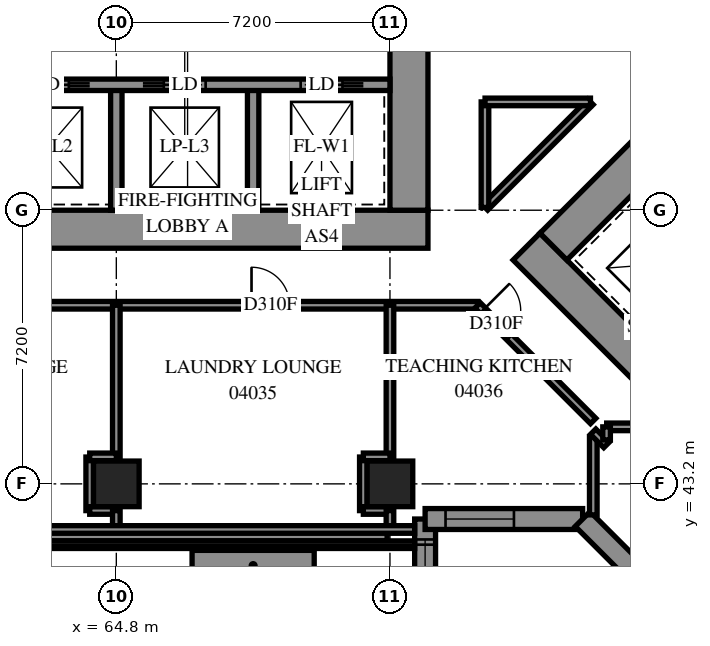
"""IFC4 building model, lengths in metres.
Left out: names, types, materials, properties, quantities, classifications, styles, units other than length and angle.
Written with IfcOpenShell. Run it as: python <this file> out.ifc"""

import sys

from ifc_helpers import new_model, si_unit, direction, frame, frame_2d, origin, origin_2d, place, context, subcontext, project, spatial, polyline, rectangle, outline, extrude, element, fill, save


model = new_model("IFC4")
c1 = context("Model", 3, precision=1e-05, world=origin(), true_north=direction((0.0, 1.0)))
c2 = subcontext(c1, "Body", "Model", "MODEL_VIEW")
j1 = project(units=[si_unit("LENGTHUNIT", "METRE"), si_unit("PLANEANGLEUNIT", "RADIAN")], contexts=[c1])
p1 = place(None, origin())
s1 = spatial("IfcSite", under=j1, at=p1, CompositionType="ELEMENT")
p2 = place(p1, origin())
s2 = spatial("IfcBuilding", under=s1, at=p2, CompositionType="ELEMENT")
p3 = place(p2, frame((0.0, 0.0, 18.6)))
s3 = spatial("IfcBuildingStorey", under=s2, at=p3, CompositionType="ELEMENT", Elevation=18.6)
for number, where, z_axis, x_axis in (
    (1, (64.8, 43.2, 0.0), (0.0, 0.0, 1.0), (1.0, 0.0, 0.0)),
    (2, (72.0, 43.2, 0.0), (0.0, 0.0, 1.0), (1.0, 0.0, 0.0)),
):
    element("IfcColumn", number, at=place(p3, frame(where, z_axis=z_axis, x_axis=x_axis)), inside=s3, PredefinedType="COLUMN", context=c2, shape_type="SweptSolid", body=[
        extrude(rectangle(XDim=1.2, YDim=1.2, at=origin_2d()), origin(), (0.0, 0.0, 1.0), 3.8),
    ])
p4 = place(p3, frame((56.6, 49.9, -0.4), z_axis=(0.0, 0.0, 1.0), x_axis=(1.0, 0.0, 0.0)))
e3 = element("IfcWall", 3, at=p4, inside=s3, PredefinedType="SHEAR", context=c2, shape_type="SweptSolid", body=[
    extrude(rectangle(XDim=16.4, YDim=1.0, at=frame_2d((8.2, 0.0))), origin(), (0.0, 0.0, 1.0), 3.5),
])
p5 = place(p3, frame((72.5, 50.4, -0.4), z_axis=(0.0, 0.0, 1.0), x_axis=(0.0, 1.0, 0.0)))
e4 = element("IfcWall", 4, at=p5, inside=s3, PredefinedType="SHEAR", context=c2, shape_type="SweptSolid", body=[
    extrude(rectangle(XDim=14.4, YDim=1.0, at=frame_2d((7.2, 0.0))), origin(), (0.0, 0.0, 1.0), 3.5),
])
p6 = place(p5, frame((4.55, 0.0, 0.4)))
e5 = element("IfcOpeningElement", 5, at=p6, cuts=e4, PredefinedType="OPENING", context=c2, shape_type="SweptSolid", body=[
    extrude(rectangle(XDim=1.1, YDim=2.1, at=frame_2d((0.55, 1.05))), frame((0.0, 0.51, 0.0), z_axis=(0.0, -1.0, 0.0), x_axis=(1.0, 0.0, 0.0)), (0.0, 0.0, 1.0), 1.02),
])
p7 = place(p5, frame((11.35, 0.0, 0.4)))
e6 = element("IfcOpeningElement", 6, at=p7, cuts=e4, PredefinedType="OPENING", context=c2, shape_type="SweptSolid", body=[
    extrude(rectangle(XDim=1.1, YDim=2.1, at=frame_2d((0.55, 1.05))), frame((0.0, 0.51, 0.0), z_axis=(0.0, -1.0, 0.0), x_axis=(1.0, 0.0, 0.0)), (0.0, 0.0, 1.0), 1.02),
])
for number, where, z_axis, x_axis in (
    (7, (64.8, 50.4, 0.0), (0.0, 0.0, 1.0), (0.0, 1.0, 0.0)),
    (8, (68.4, 50.4, 0.0), (0.0, 0.0, 1.0), (0.0, 1.0, 0.0)),
):
    element("IfcWall", number, at=place(p3, frame(where, z_axis=z_axis, x_axis=x_axis)), inside=s3, PredefinedType="SOLIDWALL", context=c2, shape_type="SweptSolid", body=[
        extrude(rectangle(XDim=3.3, YDim=0.3, at=frame_2d((1.65, 0.0))), origin(), (0.0, 0.0, 1.0), 3.8),
    ])
p8 = place(p3, frame((57.6, 53.7, 0.0), z_axis=(0.0, 0.0, 1.0), x_axis=(1.0, 0.0, 0.0)))
e9 = element("IfcWall", 9, at=p8, inside=s3, PredefinedType="SOLIDWALL", context=c2, shape_type="SweptSolid", body=[
    extrude(rectangle(XDim=14.4, YDim=0.3, at=frame_2d((7.2, 0.0))), origin(), (0.0, 0.0, 1.0), 3.8),
])
p9 = place(p8, frame((1.25, 0.0, 0.0)))
e10 = element("IfcOpeningElement", 10, at=p9, cuts=e9, PredefinedType="OPENING", context=c2, shape_type="SweptSolid", body=[
    extrude(rectangle(XDim=1.1, YDim=2.1, at=frame_2d((0.55, 1.05))), frame((0.0, 0.16, 0.0), z_axis=(0.0, -1.0, 0.0), x_axis=(1.0, 0.0, 0.0)), (0.0, 0.0, 1.0), 0.32),
])
p10 = place(p8, frame((4.85, 0.0, 0.0)))
e11 = element("IfcOpeningElement", 11, at=p10, cuts=e9, PredefinedType="OPENING", context=c2, shape_type="SweptSolid", body=[
    extrude(rectangle(XDim=1.1, YDim=2.1, at=frame_2d((0.55, 1.05))), frame((0.0, 0.16, 0.0), z_axis=(0.0, -1.0, 0.0), x_axis=(1.0, 0.0, 0.0)), (0.0, 0.0, 1.0), 0.32),
])
p11 = place(p8, frame((8.45, 0.0, 0.0)))
e12 = element("IfcOpeningElement", 12, at=p11, cuts=e9, PredefinedType="OPENING", context=c2, shape_type="SweptSolid", body=[
    extrude(rectangle(XDim=1.1, YDim=2.1, at=frame_2d((0.55, 1.05))), frame((0.0, 0.16, 0.0), z_axis=(0.0, -1.0, 0.0), x_axis=(1.0, 0.0, 0.0)), (0.0, 0.0, 1.0), 0.32),
])
p12 = place(p8, frame((12.05, 0.0, 0.0)))
e13 = element("IfcOpeningElement", 13, at=p12, cuts=e9, PredefinedType="OPENING", context=c2, shape_type="SweptSolid", body=[
    extrude(rectangle(XDim=1.1, YDim=2.1, at=frame_2d((0.55, 1.05))), frame((0.0, 0.16, 0.0), z_axis=(0.0, -1.0, 0.0), x_axis=(1.0, 0.0, 0.0)), (0.0, 0.0, 1.0), 0.32),
])
p13 = place(p3, frame((75.594, 49.443, -0.4), z_axis=(0.0, 0.0, 1.0), x_axis=(0.7071037324, -0.70710983, 0.0)))
e14 = element("IfcWall", 14, at=p13, inside=s3, PredefinedType="SHEAR", context=c2, shape_type="SweptSolid", body=[
    extrude(rectangle(XDim=16.4, YDim=1.0, at=frame_2d((8.2, 0.0))), origin(), (0.0, 0.0, 1.0), 3.5),
])
p14 = place(p3, frame((76.301, 49.443, -0.4), z_axis=(0.0, 0.0, 1.0), x_axis=(0.7071067812, 0.7071067812, 0.0)))
e15 = element("IfcWall", 15, at=p14, inside=s3, PredefinedType="SHEAR", context=c2, shape_type="SweptSolid", body=[
    extrude(rectangle(XDim=14.4, YDim=1.0, at=frame_2d((7.2, 0.0))), origin(), (0.0, 0.0, 1.0), 3.5),
])
p15 = place(p14, frame((4.55, 0.0, 0.4)))
e16 = element("IfcOpeningElement", 16, at=p15, cuts=e15, PredefinedType="OPENING", context=c2, shape_type="SweptSolid", body=[
    extrude(rectangle(XDim=1.1, YDim=2.1, at=frame_2d((0.55, 1.05))), frame((0.0, 0.51, 0.0), z_axis=(0.0, -1.0, 0.0), x_axis=(1.0, 0.0, 0.0)), (0.0, 0.0, 1.0), 1.02),
])
p16 = place(p14, frame((11.35, 0.0, 0.4)))
e17 = element("IfcOpeningElement", 17, at=p16, cuts=e15, PredefinedType="OPENING", context=c2, shape_type="SweptSolid", body=[
    extrude(rectangle(XDim=1.1, YDim=2.1, at=frame_2d((0.55, 1.05))), frame((0.0, 0.51, 0.0), z_axis=(0.0, -1.0, 0.0), x_axis=(1.0, 0.0, 0.0)), (0.0, 0.0, 1.0), 1.02),
])
p17 = place(p3, frame((72.925, 35.075, 0.0), z_axis=(0.0, 0.0, 1.0), x_axis=(0.0, 1.0, 0.0)))
e18 = element("IfcWall", 18, at=p17, inside=s3, PredefinedType="SOLIDWALL", context=c2, shape_type="SweptSolid", body=[
    extrude(outline(polyline([(-0.275, -0.275), (6.925, -0.275), (7.475, 0.275), (0.275, 0.275), (-0.275, -0.275)])), origin(), (0.0, 0.0, 1.0), 3.8),
])
p18 = place(p17, frame((1.825, 0.0, 0.7)))
e19 = element("IfcOpeningElement", 19, at=p18, cuts=e18, PredefinedType="OPENING", context=c2, shape_type="SweptSolid", body=[
    extrude(rectangle(XDim=1.8, YDim=2.4, at=frame_2d((0.9, 1.2))), frame((0.0, 0.285, 0.0), z_axis=(0.0, -1.0, 0.0), x_axis=(1.0, 0.0, 0.0)), (0.0, 0.0, 1.0), 0.57),
])
p19 = place(p17, frame((4.862, 0.0, 0.7)))
e20 = element("IfcOpeningElement", 20, at=p19, cuts=e18, PredefinedType="OPENING", context=c2, shape_type="SweptSolid", body=[
    extrude(rectangle(XDim=1.8, YDim=2.4, at=frame_2d((0.9, 1.2))), frame((0.0, 0.285, 0.0), z_axis=(0.0, -1.0, 0.0), x_axis=(1.0, 0.0, 0.0)), (0.0, 0.0, 1.0), 0.57),
])
p20 = place(p3, frame((72.925, 42.275, 0.0), z_axis=(0.0, 0.0, 1.0), x_axis=(1.0, 0.0, 0.0)))
e21 = element("IfcWall", 21, at=p20, inside=s3, PredefinedType="SOLIDWALL", context=c2, shape_type="SweptSolid", body=[
    extrude(outline(polyline([(0.275, -0.275), (4.031, -0.275), (4.259, 0.275), (-0.275, 0.275), (0.275, -0.275)])), origin(), (0.0, 0.0, 1.0), 3.8),
])
p21 = place(p20, frame((0.537, 0.0, 0.7)))
e22 = element("IfcOpeningElement", 22, at=p21, cuts=e21, PredefinedType="OPENING", context=c2, shape_type="SweptSolid", body=[
    extrude(rectangle(XDim=1.8, YDim=2.4, at=frame_2d((0.9, 1.2))), frame((0.0, 0.285, 0.0), z_axis=(0.0, -1.0, 0.0), x_axis=(1.0, 0.0, 0.0)), (0.0, 0.0, 1.0), 0.57),
])
p22 = place(p3, frame((77.07, 42.275, 0.0), z_axis=(0.0, 0.0, 1.0), x_axis=(0.7071067812, -0.7071067812, 0.0)))
e23 = element("IfcWall", 23, at=p22, inside=s3, PredefinedType="SOLIDWALL", context=c2, shape_type="SweptSolid", body=[
    extrude(outline(polyline([(0.114, -0.275), (39.288, -0.275), (38.737, 0.275), (-0.114, 0.275), (0.114, -0.275)])), origin(), (0.0, 0.0, 1.0), 3.8),
])
p23 = place(p22, frame((2.837, 0.0, 0.7)))
e24 = element("IfcOpeningElement", 24, at=p23, cuts=e23, PredefinedType="OPENING", context=c2, shape_type="SweptSolid", body=[
    extrude(rectangle(XDim=1.8, YDim=2.4, at=frame_2d((0.9, 1.2))), frame((0.0, 0.285, 0.0), z_axis=(0.0, -1.0, 0.0), x_axis=(1.0, 0.0, 0.0)), (0.0, 0.0, 1.0), 0.57),
])
p24 = place(p22, frame((6.588, 0.0, 0.7)))
e25 = element("IfcOpeningElement", 25, at=p24, cuts=e23, PredefinedType="OPENING", context=c2, shape_type="SweptSolid", body=[
    extrude(rectangle(XDim=1.8, YDim=2.4, at=frame_2d((0.9, 1.2))), frame((0.0, 0.285, 0.0), z_axis=(0.0, -1.0, 0.0), x_axis=(1.0, 0.0, 0.0)), (0.0, 0.0, 1.0), 0.57),
])
p25 = place(p22, frame((10.188, 0.0, 0.7)))
e26 = element("IfcOpeningElement", 26, at=p25, cuts=e23, PredefinedType="OPENING", context=c2, shape_type="SweptSolid", body=[
    extrude(rectangle(XDim=1.8, YDim=2.4, at=frame_2d((0.9, 1.2))), frame((0.0, 0.285, 0.0), z_axis=(0.0, -1.0, 0.0), x_axis=(1.0, 0.0, 0.0)), (0.0, 0.0, 1.0), 0.57),
])
p26 = place(p22, frame((13.787, 0.0, 0.7)))
e27 = element("IfcOpeningElement", 27, at=p26, cuts=e23, PredefinedType="OPENING", context=c2, shape_type="SweptSolid", body=[
    extrude(rectangle(XDim=1.8, YDim=2.4, at=frame_2d((0.9, 1.2))), frame((0.0, 0.285, 0.0), z_axis=(0.0, -1.0, 0.0), x_axis=(1.0, 0.0, 0.0)), (0.0, 0.0, 1.0), 0.57),
])
p27 = place(p22, frame((17.387, 0.0, 0.7)))
e28 = element("IfcOpeningElement", 28, at=p27, cuts=e23, PredefinedType="OPENING", context=c2, shape_type="SweptSolid", body=[
    extrude(rectangle(XDim=1.8, YDim=2.4, at=frame_2d((0.9, 1.2))), frame((0.0, 0.285, 0.0), z_axis=(0.0, -1.0, 0.0), x_axis=(1.0, 0.0, 0.0)), (0.0, 0.0, 1.0), 0.57),
])
p28 = place(p22, frame((20.988, 0.0, 0.7)))
e29 = element("IfcOpeningElement", 29, at=p28, cuts=e23, PredefinedType="OPENING", context=c2, shape_type="SweptSolid", body=[
    extrude(rectangle(XDim=1.8, YDim=2.4, at=frame_2d((0.9, 1.2))), frame((0.0, 0.285, 0.0), z_axis=(0.0, -1.0, 0.0), x_axis=(1.0, 0.0, 0.0)), (0.0, 0.0, 1.0), 0.57),
])
p29 = place(p22, frame((24.587, 0.0, 0.7)))
e30 = element("IfcOpeningElement", 30, at=p29, cuts=e23, PredefinedType="OPENING", context=c2, shape_type="SweptSolid", body=[
    extrude(rectangle(XDim=1.8, YDim=2.4, at=frame_2d((0.9, 1.2))), frame((0.0, 0.285, 0.0), z_axis=(0.0, -1.0, 0.0), x_axis=(1.0, 0.0, 0.0)), (0.0, 0.0, 1.0), 0.57),
])
p30 = place(p22, frame((28.188, 0.0, 0.7)))
e31 = element("IfcOpeningElement", 31, at=p30, cuts=e23, PredefinedType="OPENING", context=c2, shape_type="SweptSolid", body=[
    extrude(rectangle(XDim=1.8, YDim=2.4, at=frame_2d((0.9, 1.2))), frame((0.0, 0.285, 0.0), z_axis=(0.0, -1.0, 0.0), x_axis=(1.0, 0.0, 0.0)), (0.0, 0.0, 1.0), 0.57),
])
p31 = place(p22, frame((31.788, 0.0, 0.7)))
e32 = element("IfcOpeningElement", 32, at=p31, cuts=e23, PredefinedType="OPENING", context=c2, shape_type="SweptSolid", body=[
    extrude(rectangle(XDim=1.8, YDim=2.4, at=frame_2d((0.9, 1.2))), frame((0.0, 0.285, 0.0), z_axis=(0.0, -1.0, 0.0), x_axis=(1.0, 0.0, 0.0)), (0.0, 0.0, 1.0), 0.57),
])
p32 = place(p22, frame((35.388, 0.0, 0.7)))
e33 = element("IfcOpeningElement", 33, at=p32, cuts=e23, PredefinedType="OPENING", context=c2, shape_type="SweptSolid", body=[
    extrude(rectangle(XDim=1.8, YDim=2.4, at=frame_2d((0.9, 1.2))), frame((0.0, 0.285, 0.0), z_axis=(0.0, -1.0, 0.0), x_axis=(1.0, 0.0, 0.0)), (0.0, 0.0, 1.0), 0.57),
])
p33 = place(p3, frame((55.1, 47.9, 0.0), z_axis=(0.0, 0.0, 1.0), x_axis=(1.0, 0.0, 0.0)))
e34 = element("IfcWall", 34, at=p33, inside=s3, PredefinedType="PARTITIONING", context=c2, shape_type="SweptSolid", body=[
    extrude(rectangle(XDim=19.208, YDim=0.2, at=frame_2d((9.604, 0.0))), origin(), (0.0, 0.0, 1.0), 3.8),
])
p34 = place(p33, frame((6.058, 0.0, 0.0)))
e35 = element("IfcOpeningElement", 35, at=p34, cuts=e34, PredefinedType="OPENING", context=c2, shape_type="SweptSolid", body=[
    extrude(rectangle(XDim=1.0, YDim=2.1, at=frame_2d((0.5, 1.05))), frame((0.0, 0.11, 0.0), z_axis=(0.0, -1.0, 0.0), x_axis=(1.0, 0.0, 0.0)), (0.0, 0.0, 1.0), 0.22),
])
p35 = place(p33, frame((13.258, 0.0, 0.0)))
e36 = element("IfcOpeningElement", 36, at=p35, cuts=e34, PredefinedType="OPENING", context=c2, shape_type="SweptSolid", body=[
    extrude(rectangle(XDim=1.0, YDim=2.1, at=frame_2d((0.5, 1.05))), frame((0.0, 0.11, 0.0), z_axis=(0.0, -1.0, 0.0), x_axis=(1.0, 0.0, 0.0)), (0.0, 0.0, 1.0), 0.22),
])
p36 = place(p3, frame((74.305, 47.897, 0.0), z_axis=(0.0, 0.0, 1.0), x_axis=(0.7071067812, -0.7071067812, 0.0)))
e37 = element("IfcWall", 37, at=p36, inside=s3, PredefinedType="PARTITIONING", context=c2, shape_type="SweptSolid", body=[
    extrude(rectangle(XDim=4.302, YDim=0.2, at=frame_2d((2.151, 0.0))), origin(), (0.0, 0.0, 1.0), 3.8),
])
p37 = place(p36, frame((0.192, 0.0, 0.0)))
e38 = element("IfcOpeningElement", 38, at=p37, cuts=e37, PredefinedType="OPENING", context=c2, shape_type="SweptSolid", body=[
    extrude(rectangle(XDim=1.0, YDim=2.1, at=frame_2d((0.5, 1.05))), frame((0.0, 0.11, 0.0), z_axis=(0.0, -1.0, 0.0), x_axis=(1.0, 0.0, 0.0)), (0.0, 0.0, 1.0), 0.22),
])
for number, where, z_axis, x_axis in (
    (39, (64.8, 43.906, 0.0), (0.0, 0.0, 1.0), (0.0, 1.0, 0.0)),
    (40, (72.0, 43.906, 0.0), (0.0, 0.0, 1.0), (0.0, 1.0, 0.0)),
):
    element("IfcWall", number, at=place(p3, frame(where, z_axis=z_axis, x_axis=x_axis)), inside=s3, PredefinedType="PARTITIONING", context=c2, shape_type="SweptSolid", body=[
        extrude(rectangle(XDim=3.994, YDim=0.2, at=frame_2d((1.997, 0.0))), origin(), (0.0, 0.0, 1.0), 3.8),
    ])
p38 = place(p3, frame((74.501, 50.473, 0.0), z_axis=(0.0, 0.0, 1.0), x_axis=(0.7071067812, 0.7071067812, 0.0)))
e41 = element("IfcWall", 41, at=p38, inside=s3, PredefinedType="PARTITIONING", context=c2, shape_type="SweptSolid", body=[
    extrude(rectangle(XDim=3.926, YDim=0.2, at=frame_2d((1.963, 0.0))), origin(), (0.0, 0.0, 1.0), 3.8),
])
p39 = place(p3, frame((74.5, 50.474, 0.0), z_axis=(0.0, 0.0, 1.0), x_axis=(0.0, 1.0, 0.0)))
e42 = element("IfcWall", 42, at=p39, inside=s3, PredefinedType="PARTITIONING", context=c2, shape_type="SweptSolid", body=[
    extrude(rectangle(XDim=2.776, YDim=0.2, at=frame_2d((1.388, 0.0))), origin(), (0.0, 0.0, 1.0), 3.8),
])
p40 = place(p3, frame((74.502, 53.25, 0.0), z_axis=(0.0, 0.0, 1.0), x_axis=(1.0, 0.0, 0.0)))
e43 = element("IfcWall", 43, at=p40, inside=s3, PredefinedType="PARTITIONING", context=c2, shape_type="SweptSolid", body=[
    extrude(rectangle(XDim=2.774, YDim=0.2, at=frame_2d((1.387, 0.0))), origin(), (0.0, 0.0, 1.0), 3.8),
])
p41 = place(p3, frame((77.35, 42.384, 0.0), z_axis=(0.0, 0.0, 1.0), x_axis=(0.0, 1.0, 0.0)))
e44 = element("IfcWall", 44, at=p41, inside=s3, PredefinedType="PARTITIONING", context=c2, shape_type="SweptSolid", body=[
    extrude(rectangle(XDim=2.052, YDim=0.2, at=frame_2d((1.026, 0.0))), origin(), (0.0, 0.0, 1.0), 3.8),
])
p42 = place(p3, frame((77.702, 44.7, 0.0), z_axis=(0.0, 0.0, 1.0), x_axis=(1.0, 0.0, 0.0)))
e45 = element("IfcWall", 45, at=p42, inside=s3, PredefinedType="PARTITIONING", context=c2, shape_type="SweptSolid", body=[
    extrude(rectangle(XDim=1.814, YDim=0.2, at=frame_2d((0.907, 0.0))), origin(), (0.0, 0.0, 1.0), 3.8),
])
for number, where, z_axis, x_axis in (
    (46, (64.1, 42.496, 0.0), (0.0, 0.0, 1.0), (0.0, 1.0, 0.0)),
    (47, (71.3, 42.496, 0.0), (0.0, 0.0, 1.0), (0.0, 1.0, 0.0)),
):
    element("IfcWall", number, at=place(p3, frame(where, z_axis=z_axis, x_axis=x_axis)), inside=s3, PredefinedType="PARTITIONING", context=c2, shape_type="SweptSolid", body=[
        extrude(rectangle(XDim=1.41, YDim=0.2, at=frame_2d((0.705, 0.0))), origin(), (0.0, 0.0, 1.0), 3.8),
    ])
for number, where, z_axis, x_axis in (
    (48, (64.1, 43.91, 0.0), (0.0, 0.0, 1.0), (1.0, 0.0, 0.0)),
    (49, (71.3, 43.91, 0.0), (0.0, 0.0, 1.0), (1.0, 0.0, 0.0)),
    (50, (64.1, 42.5, 0.0), (0.0, 0.0, 1.0), (1.0, 0.0, 0.0)),
    (51, (71.3, 42.5, 0.0), (0.0, 0.0, 1.0), (1.0, 0.0, 0.0)),
):
    element("IfcWall", number, at=place(p3, frame(where, z_axis=z_axis, x_axis=x_axis)), inside=s3, PredefinedType="PARTITIONING", context=c2, shape_type="SweptSolid", body=[
        extrude(rectangle(XDim=0.7, YDim=0.2, at=frame_2d((0.35, 0.0))), origin(), (0.0, 0.0, 1.0), 3.8),
    ])
for number, where, z_axis, x_axis in (
    (52, (64.8, 42.0, 0.0), (0.0, 0.0, 1.0), (0.0, 1.0, 0.0)),
    (53, (72.0, 42.0, 0.0), (0.0, 0.0, 1.0), (0.0, 1.0, 0.0)),
):
    element("IfcWall", number, at=place(p3, frame(where, z_axis=z_axis, x_axis=x_axis)), inside=s3, PredefinedType="PARTITIONING", context=c2, shape_type="SweptSolid", body=[
        extrude(rectangle(XDim=0.496, YDim=0.2, at=frame_2d((0.248, 0.0))), origin(), (0.0, 0.0, 1.0), 3.8),
    ])
p43 = place(p3, frame((77.347, 44.573, 0.0), z_axis=(0.0, 0.0, 1.0), x_axis=(0.7071067812, -0.7071067812, 0.0)))
e54 = element("IfcWall", 54, at=p43, inside=s3, PredefinedType="PARTITIONING", context=c2, shape_type="SweptSolid", body=[
    extrude(rectangle(XDim=0.495, YDim=0.2, at=frame_2d((0.247, 0.0))), origin(), (0.0, 0.0, 1.0), 3.8),
])
p44 = place(p3, frame((77.7, 44.356, 0.0), z_axis=(0.0, 0.0, 1.0), x_axis=(0.0, 1.0, 0.0)))
e55 = element("IfcWall", 55, at=p44, inside=s3, PredefinedType="PARTITIONING", context=c2, shape_type="SweptSolid", body=[
    extrude(rectangle(XDim=0.344, YDim=0.2, at=frame_2d((0.172, 0.0))), origin(), (0.0, 0.0, 1.0), 3.8),
])
p45 = place(p3, frame((71.925, 41.825, 0.0), z_axis=(0.0, 0.0, 1.0), x_axis=(-1.0, 0.0, 0.0)))
e56 = element("IfcWall", 56, at=p45, inside=s3, PredefinedType="SOLIDWALL", context=c2, shape_type="SweptSolid", body=[
    extrude(rectangle(XDim=57.45, YDim=0.25, at=frame_2d((28.725, 0.0))), origin(), (0.0, 0.0, 1.0), 3.8),
])
p46 = place(p45, frame((12.325, 0.0, 0.0)))
e57 = element("IfcOpeningElement", 57, at=p46, cuts=e56, PredefinedType="OPENING", context=c2, shape_type="SweptSolid", body=[
    extrude(rectangle(XDim=1.0, YDim=2.1, at=frame_2d((0.5, 1.05))), frame((0.0, 0.135, 0.0), z_axis=(0.0, -1.0, 0.0), x_axis=(1.0, 0.0, 0.0)), (0.0, 0.0, 1.0), 0.27),
])
p47 = place(p45, frame((44.125, 0.0, 0.0)))
e58 = element("IfcOpeningElement", 58, at=p47, cuts=e56, PredefinedType="OPENING", context=c2, shape_type="SweptSolid", body=[
    extrude(rectangle(XDim=1.0, YDim=2.1, at=frame_2d((0.5, 1.05))), frame((0.0, 0.135, 0.0), z_axis=(0.0, -1.0, 0.0), x_axis=(1.0, 0.0, 0.0)), (0.0, 0.0, 1.0), 0.27),
])
p48 = place(p3, frame((59.75, 42.0, 0.0), z_axis=(0.0, 0.0, 1.0), x_axis=(1.0, 0.0, 0.0)))
e59 = element("IfcWall", 59, at=p48, inside=s3, PredefinedType="PARTITIONING", context=c2, shape_type="SweptSolid", body=[
    extrude(outline(polyline([(0.0, -0.1), (12.9, -0.1), (12.9, 0.1), (0.0, 0.1), (0.0, -0.1)])), origin(), (0.0, 0.0, 1.0), 3.8),
])
p49 = place(p3, frame((72.65, 41.6, 0.0), z_axis=(0.0, 0.0, 1.0), x_axis=(-1.0, 0.0, 0.0)))
e60 = element("IfcWall", 60, at=p49, inside=s3, PredefinedType="PARAPET", context=c2, shape_type="SweptSolid", body=[
    extrude(outline(polyline([(0.0, -0.1), (12.78, -0.1), (12.78, 0.1), (0.0, 0.1), (0.0, -0.1)])), origin(), (0.0, 0.0, 1.0), 0.25),
])
p50 = place(p3, frame((70.007, 41.05, 0.0), z_axis=(0.0, 0.0, 1.0), x_axis=(-1.0, 0.0, 0.0)))
e61 = element("IfcWall", 61, at=p50, inside=s3, PredefinedType="SOLIDWALL", context=c2, shape_type="SweptSolid", body=[
    extrude(outline(polyline([(0.0, -0.4), (3.214, -0.4), (3.214, 0.4), (0.0, 0.4), (0.0, -0.4)])), origin(), (0.0, 0.0, 1.0), 0.65),
])
p51 = place(p19, origin())
e62 = element("IfcWindow", 62, at=p51, inside=s3, PartitioningType="SINGLE_PANEL", PredefinedType="WINDOW", context=c2, shape_type="SweptSolid", body=[
    extrude(rectangle(XDim=1.8, YDim=2.4, at=frame_2d((0.9, 1.2))), frame((0.0, 0.155, 0.0), z_axis=(0.0, -1.0, 0.0), x_axis=(1.0, 0.0, 0.0)), (0.0, 0.0, 1.0), 0.06),
])
fill(e20, e62)
p52 = place(p21, origin())
e63 = element("IfcWindow", 63, at=p52, inside=s3, PartitioningType="SINGLE_PANEL", PredefinedType="WINDOW", context=c2, shape_type="SweptSolid", body=[
    extrude(rectangle(XDim=1.8, YDim=2.4, at=frame_2d((0.9, 1.2))), frame((0.0, 0.155, 0.0), z_axis=(0.0, -1.0, 0.0), x_axis=(1.0, 0.0, 0.0)), (0.0, 0.0, 1.0), 0.06),
])
fill(e22, e63)
p53 = place(p10, origin())
e64 = element("IfcDoor", 64, at=p53, inside=s3, OperationType="SLIDING_TO_RIGHT", PredefinedType="DOOR", context=c2, shape_type="SweptSolid", body=[
    extrude(rectangle(XDim=1.1, YDim=2.1, at=frame_2d((0.55, 1.05))), frame((0.0, 0.025, 0.0), z_axis=(0.0, -1.0, 0.0), x_axis=(1.0, 0.0, 0.0)), (0.0, 0.0, 1.0), 0.05),
])
fill(e11, e64)
p54 = place(p11, origin())
e65 = element("IfcDoor", 65, at=p54, inside=s3, OperationType="SLIDING_TO_LEFT", PredefinedType="DOOR", context=c2, shape_type="SweptSolid", body=[
    extrude(rectangle(XDim=1.1, YDim=2.1, at=frame_2d((0.55, 1.05))), frame((0.0, 0.025, 0.0), z_axis=(0.0, -1.0, 0.0), x_axis=(1.0, 0.0, 0.0)), (0.0, 0.0, 1.0), 0.05),
])
fill(e12, e65)
p55 = place(p12, origin())
e66 = element("IfcDoor", 66, at=p55, inside=s3, OperationType="SLIDING_TO_RIGHT", PredefinedType="DOOR", context=c2, shape_type="SweptSolid", body=[
    extrude(rectangle(XDim=1.1, YDim=2.1, at=frame_2d((0.55, 1.05))), frame((0.0, 0.025, 0.0), z_axis=(0.0, -1.0, 0.0), x_axis=(1.0, 0.0, 0.0)), (0.0, 0.0, 1.0), 0.05),
])
fill(e13, e66)
p56 = place(p35, origin())
e67 = element("IfcDoor", 67, at=p56, inside=s3, OperationType="SINGLE_SWING_LEFT", PredefinedType="DOOR", context=c2, shape_type="SweptSolid", body=[
    extrude(rectangle(XDim=1.0, YDim=2.1, at=frame_2d((0.5, 1.05))), frame((0.0, 0.025, 0.0), z_axis=(0.0, -1.0, 0.0), x_axis=(1.0, 0.0, 0.0)), (0.0, 0.0, 1.0), 0.05),
])
fill(e36, e67)
p57 = place(p37, origin())
e68 = element("IfcDoor", 68, at=p57, inside=s3, OperationType="SINGLE_SWING_LEFT", PredefinedType="DOOR", context=c2, shape_type="SweptSolid", body=[
    extrude(rectangle(XDim=1.0, YDim=2.1, at=frame_2d((0.5, 1.05))), frame((0.0, 0.025, 0.0), z_axis=(0.0, -1.0, 0.0), x_axis=(1.0, 0.0, 0.0)), (0.0, 0.0, 1.0), 0.05),
])
fill(e38, e68)
save(model, sys.argv[1])
